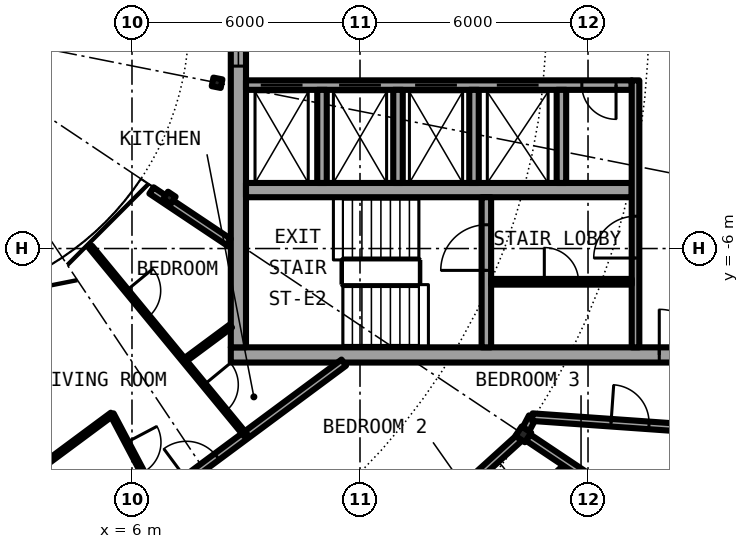
"""IFC4 building model, lengths in metres.
Left out: names, types, materials, properties, quantities, classifications, styles, units other than length and angle.
Written with IfcOpenShell. Run it as: python <this file> out.ifc"""

import sys

from ifc_helpers import new_model, si_unit, direction, frame, frame_2d, origin, origin_2d, place, context, subcontext, project, spatial, rectangle, i_section, extrude, element, fill, save


model = new_model("IFC4")
c1 = context("Model", 3, precision=1e-05, world=origin(), true_north=direction((0.0, 1.0)))
c2 = subcontext(c1, "Body", "Model", "MODEL_VIEW")
j1 = project(units=[si_unit("LENGTHUNIT", "METRE"), si_unit("PLANEANGLEUNIT", "RADIAN")], contexts=[c1])
p1 = place(None, origin())
s1 = spatial("IfcSite", under=j1, at=p1, CompositionType="ELEMENT")
p2 = place(p1, origin())
s2 = spatial("IfcBuilding", under=s1, at=p2, CompositionType="ELEMENT")
p3 = place(p2, frame((0.0, 0.0, 246.25)))
s3 = spatial("IfcBuildingStorey", under=s2, at=p3, CompositionType="ELEMENT", Elevation=246.25)
p4 = place(p3, frame((16.297, -10.889, 0.0), z_axis=(0.0, 0.0, 1.0), x_axis=(0.831469612303, -0.55557023302, 0.0)))
e1 = element("IfcColumn", 1, at=p4, inside=s3, PredefinedType="COLUMN", context=c2, shape_type="SweptSolid", body=[
    extrude(i_section(OverallWidth=0.3, OverallDepth=0.3, WebThickness=0.011, FlangeThickness=0.019, FilletRadius=0.027, at=origin_2d()), origin(), (0.0, 0.0, 1.0), 3.05),
])
for number, where, z_axis, x_axis in (
    (2, (6.984, -4.667, 0.0), (0.0, 0.0, 1.0), (0.831, -0.556, 0.0)),
    (3, (8.239, -1.639, 0.0), (0.0, 0.0, 1.0), (0.981, -0.195, 0.0)),
):
    element("IfcColumn", number, at=place(p3, frame(where, z_axis=z_axis, x_axis=x_axis)), inside=s3, PredefinedType="COLUMN", context=c2, shape_type="SweptSolid", body=[
        extrude(i_section(OverallWidth=0.24, OverallDepth=0.23, WebThickness=0.008, FlangeThickness=0.012, FilletRadius=0.021, at=origin_2d()), origin(), (0.0, 0.0, 1.0), 3.05),
    ])
p5 = place(p3, frame((8.6, -8.8, 0.0), z_axis=(0.0, 0.0, 1.0), x_axis=(1.0, 0.0, 0.0)))
e4 = element("IfcWall", 4, at=p5, inside=s3, PredefinedType="SHEAR", context=c2, shape_type="SweptSolid", body=[
    extrude(rectangle(XDim=13.4, YDim=0.4, at=frame_2d((6.7, 0.0))), origin(), (0.0, 0.0, 1.0), 3.05),
])
p6 = place(p5, frame((11.275, 0.0, 0.0)))
e5 = element("IfcOpeningElement", 5, at=p6, cuts=e4, PredefinedType="OPENING", context=c2, shape_type="SweptSolid", body=[
    extrude(rectangle(XDim=1.2, YDim=2.3, at=frame_2d((0.6, 1.15))), frame((0.0, 0.21, 0.0), z_axis=(0.0, -1.0, 0.0), x_axis=(1.0, 0.0, 0.0)), (0.0, 0.0, 1.0), 0.42),
])
p7 = place(p3, frame((8.8, -8.6, 0.0), z_axis=(0.0, 0.0, 1.0), x_axis=(0.0, 1.0, 0.0)))
e6 = element("IfcWall", 6, at=p7, inside=s3, PredefinedType="SHEAR", context=c2, shape_type="SweptSolid", body=[
    extrude(rectangle(XDim=17.2, YDim=0.4, at=frame_2d((8.6, 0.0))), origin(), (0.0, 0.0, 1.0), 3.05),
])
p8 = place(p7, frame((7.4, 0.0, 0.1)))
e7 = element("IfcOpeningElement", 7, at=p8, cuts=e6, PredefinedType="OPENING", context=c2, shape_type="SweptSolid", body=[
    extrude(rectangle(XDim=2.4, YDim=2.2, at=frame_2d((1.2, 1.1))), frame((0.0, 0.21, 0.0), z_axis=(0.0, -1.0, 0.0), x_axis=(1.0, 0.0, 0.0)), (0.0, 0.0, 1.0), 0.42),
])
p9 = place(p3, frame((19.15, -1.7, 0.0), z_axis=(0.0, 0.0, 1.0), x_axis=(-1.0, 0.0, 0.0)))
e8 = element("IfcWall", 8, at=p9, inside=s3, PredefinedType="SHEAR", context=c2, shape_type="SweptSolid", body=[
    extrude(rectangle(XDim=10.15, YDim=0.25, at=frame_2d((5.075, 0.0))), origin(), (0.0, 0.0, 1.0), 3.05),
])
p10 = place(p9, frame((8.663, 0.0, 0.0)))
e9 = element("IfcOpeningElement", 9, at=p10, cuts=e8, PredefinedType="OPENING", context=c2, shape_type="SweptSolid", body=[
    extrude(rectangle(XDim=1.1, YDim=2.3, at=frame_2d((0.55, 1.15))), frame((0.0, 0.135, 0.0), z_axis=(0.0, -1.0, 0.0), x_axis=(1.0, 0.0, 0.0)), (0.0, 0.0, 1.0), 0.27),
])
p11 = place(p9, frame((6.6, 0.0, 0.0)))
e10 = element("IfcOpeningElement", 10, at=p11, cuts=e8, PredefinedType="OPENING", context=c2, shape_type="SweptSolid", body=[
    extrude(rectangle(XDim=1.1, YDim=2.3, at=frame_2d((0.55, 1.15))), frame((0.0, 0.135, 0.0), z_axis=(0.0, -1.0, 0.0), x_axis=(1.0, 0.0, 0.0)), (0.0, 0.0, 1.0), 0.27),
])
p12 = place(p9, frame((4.6, 0.0, 0.0)))
e11 = element("IfcOpeningElement", 11, at=p12, cuts=e8, PredefinedType="OPENING", context=c2, shape_type="SweptSolid", body=[
    extrude(rectangle(XDim=1.1, YDim=2.3, at=frame_2d((0.55, 1.15))), frame((0.0, 0.135, 0.0), z_axis=(0.0, -1.0, 0.0), x_axis=(1.0, 0.0, 0.0)), (0.0, 0.0, 1.0), 0.27),
])
p13 = place(p9, frame((2.45, 0.0, 0.0)))
e12 = element("IfcOpeningElement", 12, at=p13, cuts=e8, PredefinedType="OPENING", context=c2, shape_type="SweptSolid", body=[
    extrude(rectangle(XDim=1.1, YDim=2.3, at=frame_2d((0.55, 1.15))), frame((0.0, 0.135, 0.0), z_axis=(0.0, -1.0, 0.0), x_axis=(1.0, 0.0, 0.0)), (0.0, 0.0, 1.0), 0.27),
])
p14 = place(p9, frame((0.413, 0.0, 0.0)))
e13 = element("IfcOpeningElement", 13, at=p14, cuts=e8, PredefinedType="OPENING", context=c2, shape_type="SweptSolid", body=[
    extrude(rectangle(XDim=0.9, YDim=2.3, at=frame_2d((0.45, 1.15))), frame((0.0, 0.135, 0.0), z_axis=(0.0, -1.0, 0.0), x_axis=(1.0, 0.0, 0.0)), (0.0, 0.0, 1.0), 0.27),
])
p15 = place(p3, frame((9.0, -4.462, 0.0), z_axis=(0.0, 0.0, 1.0), x_axis=(1.0, 0.0, 0.0)))
e14 = element("IfcWall", 14, at=p15, inside=s3, PredefinedType="SHEAR", context=c2, shape_type="SweptSolid", body=[
    extrude(rectangle(XDim=10.15, YDim=0.375, at=frame_2d((5.075, 0.0))), origin(), (0.0, 0.0, 1.0), 3.05),
])
p16 = place(p3, frame((15.325, -8.6, 0.0), z_axis=(0.0, 0.0, 1.0), x_axis=(0.0, 1.0, 0.0)))
e15 = element("IfcWall", 15, at=p16, inside=s3, PredefinedType="SHEAR", context=c2, shape_type="SweptSolid", body=[
    extrude(rectangle(XDim=3.95, YDim=0.25, at=frame_2d((1.975, 0.0))), origin(), (0.0, 0.0, 1.0), 3.05),
])
p17 = place(p16, frame((2.025, 0.0, 0.0)))
e16 = element("IfcOpeningElement", 16, at=p17, cuts=e15, PredefinedType="OPENING", context=c2, shape_type="SweptSolid", body=[
    extrude(rectangle(XDim=1.2, YDim=2.3, at=frame_2d((0.6, 1.15))), frame((0.0, 0.135, 0.0), z_axis=(0.0, -1.0, 0.0), x_axis=(1.0, 0.0, 0.0)), (0.0, 0.0, 1.0), 0.27),
])
for number, where, z_axis, x_axis in (
    (17, (15.0, -1.825, 0.0), (0.0, 0.0, 1.0), (0.0, -1.0, 0.0)),
    (18, (17.3, -1.825, 0.0), (0.0, 0.0, 1.0), (0.0, -1.0, 0.0)),
):
    element("IfcWall", number, at=place(p3, frame(where, z_axis=z_axis, x_axis=x_axis)), inside=s3, PredefinedType="SOLIDWALL", context=c2, shape_type="SweptSolid", body=[
        extrude(rectangle(XDim=2.45, YDim=0.25, at=frame_2d((1.225, 0.0))), origin(), (0.0, 0.0, 1.0), 2.7),
    ])
p18 = place(p3, frame((19.25, -8.6, 0.0), z_axis=(0.0, 0.0, 1.0), x_axis=(0.0, 1.0, 0.0)))
e19 = element("IfcWall", 19, at=p18, inside=s3, PredefinedType="SOLIDWALL", context=c2, shape_type="SweptSolid", body=[
    extrude(rectangle(XDim=7.025, YDim=0.2, at=frame_2d((3.513, 0.0))), origin(), (0.0, 0.0, 1.0), 2.7),
])
p19 = place(p18, frame((2.35, 0.0, 0.0)))
e20 = element("IfcOpeningElement", 20, at=p19, cuts=e19, PredefinedType="OPENING", context=c2, shape_type="SweptSolid", body=[
    extrude(rectangle(XDim=1.1, YDim=2.3, at=frame_2d((0.55, 1.15))), frame((0.0, 0.11, 0.0), z_axis=(0.0, -1.0, 0.0), x_axis=(1.0, 0.0, 0.0)), (0.0, 0.0, 1.0), 0.22),
])
for number, where, z_axis, x_axis in (
    (21, (11.0, -1.825, 0.0), (0.0, 0.0, 1.0), (0.0, -1.0, 0.0)),
    (22, (13.0, -1.825, 0.0), (0.0, 0.0, 1.0), (0.0, -1.0, 0.0)),
):
    element("IfcWall", number, at=place(p3, frame(where, z_axis=z_axis, x_axis=x_axis)), inside=s3, PredefinedType="SOLIDWALL", context=c2, shape_type="SweptSolid", body=[
        extrude(rectangle(XDim=2.45, YDim=0.25, at=frame_2d((1.225, 0.0))), origin(), (0.0, 0.0, 1.0), 2.7),
    ])
p20 = place(p3, frame((15.45, -6.875, 0.0), z_axis=(0.0, 0.0, 1.0), x_axis=(1.0, 0.0, 0.0)))
e23 = element("IfcWall", 23, at=p20, inside=s3, PredefinedType="PARTITIONING", context=c2, shape_type="SweptSolid", body=[
    extrude(rectangle(XDim=3.7, YDim=0.15, at=frame_2d((1.85, 0.0))), origin(), (0.0, 0.0, 1.0), 2.7),
])
p21 = place(p20, frame((1.4, 0.0, 0.0)))
e24 = element("IfcOpeningElement", 24, at=p21, cuts=e23, PredefinedType="OPENING", context=c2, shape_type="SweptSolid", body=[
    extrude(rectangle(XDim=0.9, YDim=2.3, at=frame_2d((0.45, 1.15))), frame((0.0, 0.085, 0.0), z_axis=(0.0, -1.0, 0.0), x_axis=(1.0, 0.0, 0.0)), (0.0, 0.0, 1.0), 0.17),
])
p22 = place(p3, frame((12.92, -15.785, 0.0), z_axis=(0.0, 0.0, 1.0), x_axis=(0.74123210671, 0.671248809297, 0.0)))
e25 = element("IfcWall", 25, at=p22, inside=s3, PredefinedType="PARTITIONING", context=c2, shape_type="SweptSolid", body=[
    extrude(rectangle(XDim=6.115, YDim=0.1, at=frame_2d((3.058, 0.0))), origin(), (0.0, 0.0, 1.0), 2.7),
])
p23 = place(p22, frame((2.622, 0.0, 0.0)))
e26 = element("IfcOpeningElement", 26, at=p23, cuts=e25, PredefinedType="OPENING", context=c2, shape_type="SweptSolid", body=[
    extrude(rectangle(XDim=0.9, YDim=2.3, at=frame_2d((0.45, 1.15))), frame((0.0, 0.06, 0.0), z_axis=(0.0, -1.0, 0.0), x_axis=(1.0, 0.0, 0.0)), (0.0, 0.0, 1.0), 0.12),
])
p24 = place(p3, frame((16.367, -10.756, 0.0), z_axis=(0.0, 0.0, 1.0), x_axis=(0.465802239822, 0.884888848035, 0.0)))
e27 = element("IfcWall", 27, at=p24, inside=s3, PredefinedType="PARTITIONING", context=c2, shape_type="SweptSolid", body=[
    extrude(rectangle(XDim=0.361, YDim=0.2, at=frame_2d((0.18, 0.0))), origin(), (0.0, 0.0, 1.0), 2.7),
])
p25 = place(p3, frame((9.239, -17.286, 0.0), z_axis=(0.0, 0.0, 1.0), x_axis=(0.740934281602, 0.671577538596, 0.0)))
e28 = element("IfcWall", 28, at=p25, inside=s3, PredefinedType="PARTITIONING", context=c2, shape_type="SweptSolid", body=[
    extrude(rectangle(XDim=9.37, YDim=0.2, at=frame_2d((4.685, 0.0))), origin(), (0.0, 0.0, 1.0), 2.45),
])
p26 = place(p25, frame((4.263, 0.0, 0.0)))
e29 = element("IfcOpeningElement", 29, at=p26, cuts=e28, PredefinedType="OPENING", context=c2, shape_type="SweptSolid", body=[
    extrude(rectangle(XDim=1.0, YDim=2.3, at=frame_2d((0.5, 1.15))), frame((0.0, 0.11, 0.0), z_axis=(0.0, -1.0, 0.0), x_axis=(1.0, 0.0, 0.0)), (0.0, 0.0, 1.0), 0.22),
])
p27 = place(p3, frame((4.354, -14.354, 0.0), z_axis=(0.0, 0.0, 1.0), x_axis=(0.80330975478, 0.595561447607, 0.0)))
e30 = element("IfcWall", 30, at=p27, inside=s3, PredefinedType="PARTITIONING", context=c2, shape_type="SweptSolid", body=[
    extrude(rectangle(XDim=8.987, YDim=0.2, at=frame_2d((4.493, 0.0))), origin(), (0.0, 0.0, 1.0), 2.7),
])
p28 = place(p27, frame((3.832, 0.0, 0.0)))
e31 = element("IfcOpeningElement", 31, at=p28, cuts=e30, PredefinedType="OPENING", context=c2, shape_type="SweptSolid", body=[
    extrude(rectangle(XDim=1.0, YDim=2.3, at=frame_2d((0.5, 1.15))), frame((0.0, 0.11, 0.0), z_axis=(0.0, -1.0, 0.0), x_axis=(1.0, 0.0, 0.0)), (0.0, 0.0, 1.0), 0.22),
])
p29 = place(p3, frame((3.571, -11.77, 0.0), z_axis=(0.0, 0.0, 1.0), x_axis=(0.803182415278, 0.59573316828, 0.0)))
e32 = element("IfcWall", 32, at=p29, inside=s3, PredefinedType="PARTITIONING", context=c2, shape_type="SweptSolid", body=[
    extrude(rectangle(XDim=2.367, YDim=0.1, at=frame_2d((1.183, 0.0))), origin(), (0.0, 0.0, 1.0), 2.7),
])
p30 = place(p3, frame((7.376, -8.948, 0.0), z_axis=(0.0, 0.0, 1.0), x_axis=(0.80332760487, 0.595537370157, 0.0)))
e33 = element("IfcWall", 33, at=p30, inside=s3, PredefinedType="PARTITIONING", context=c2, shape_type="SweptSolid", body=[
    extrude(rectangle(XDim=1.526, YDim=0.1, at=frame_2d((0.763, 0.0))), origin(), (0.0, 0.0, 1.0), 2.7),
])
p31 = place(p3, frame((16.535, -10.437, 0.0), z_axis=(0.0, 0.0, 1.0), x_axis=(0.997515141784, -0.070452408845, 0.0)))
e34 = element("IfcWall", 34, at=p31, inside=s3, PredefinedType="PARTITIONING", context=c2, shape_type="SweptSolid", body=[
    extrude(rectangle(XDim=5.153, YDim=0.2, at=frame_2d((2.576, 0.0))), origin(), (0.0, 0.0, 1.0), 2.7),
])
p32 = place(p31, frame((2.076, 0.0, 0.0)))
e35 = element("IfcOpeningElement", 35, at=p32, cuts=e34, PredefinedType="OPENING", context=c2, shape_type="SweptSolid", body=[
    extrude(rectangle(XDim=1.0, YDim=2.3, at=frame_2d((0.5, 1.15))), frame((0.0, 0.11, 0.0), z_axis=(0.0, -1.0, 0.0), x_axis=(1.0, 0.0, 0.0)), (0.0, 0.0, 1.0), 0.22),
])
p33 = place(p3, frame((6.513, -4.472, 0.0), z_axis=(0.0, 0.0, 1.0), x_axis=(0.831450132577, -0.555599385382, 0.0)))
e36 = element("IfcWall", 36, at=p33, inside=s3, PredefinedType="PARTITIONING", context=c2, shape_type="SweptSolid", body=[
    extrude(rectangle(XDim=2.443, YDim=0.2, at=frame_2d((1.221, 0.0))), origin(), (0.0, 0.0, 1.0), 2.7),
])
p34 = place(p3, frame((2.241, -7.388, 0.0), z_axis=(0.0, 0.0, 1.0), x_axis=(0.29039551313, -0.956906707027, 0.0)))
e37 = element("IfcWall", 37, at=p34, inside=s3, PredefinedType="PARTITIONING", context=c2, shape_type="SweptSolid", body=[
    extrude(rectangle(XDim=7.28, YDim=0.2, at=frame_2d((3.64, 0.0))), origin(), (0.0, 0.0, 1.0), 2.7),
])
p35 = place(p3, frame((4.909, -5.958, 0.0), z_axis=(0.0, 0.0, 1.0), x_axis=(0.635941750694, -0.771737059965, 0.0)))
e38 = element("IfcWall", 38, at=p35, inside=s3, PredefinedType="PARTITIONING", context=c2, shape_type="SweptSolid", body=[
    extrude(rectangle(XDim=6.422, YDim=0.1, at=frame_2d((3.211, 0.0))), origin(), (0.0, 0.0, 1.0), 2.7),
])
p36 = place(p35, frame((4.699, 0.0, 0.0)))
e39 = element("IfcOpeningElement", 39, at=p36, cuts=e38, PredefinedType="OPENING", context=c2, shape_type="SweptSolid", body=[
    extrude(rectangle(XDim=0.9, YDim=2.3, at=frame_2d((0.45, 1.15))), frame((0.0, 0.06, 0.0), z_axis=(0.0, -1.0, 0.0), x_axis=(1.0, 0.0, 0.0)), (0.0, 0.0, 1.0), 0.12),
])
p37 = place(p35, frame((1.488, 0.0, 0.0)))
e40 = element("IfcOpeningElement", 40, at=p37, cuts=e38, PredefinedType="OPENING", context=c2, shape_type="SweptSolid", body=[
    extrude(rectangle(XDim=0.9, YDim=2.3, at=frame_2d((0.45, 1.15))), frame((0.0, 0.06, 0.0), z_axis=(0.0, -1.0, 0.0), x_axis=(1.0, 0.0, 0.0)), (0.0, 0.0, 1.0), 0.12),
])
p38 = place(p3, frame((5.472, -10.36, 0.0), z_axis=(0.0, 0.0, 1.0), x_axis=(0.467373035141, -0.884060204976, 0.0)))
e41 = element("IfcWall", 41, at=p38, inside=s3, PredefinedType="PARTITIONING", context=c2, shape_type="SweptSolid", body=[
    extrude(rectangle(XDim=2.572, YDim=0.1, at=frame_2d((1.286, 0.0))), origin(), (0.0, 0.0, 1.0), 2.7),
])
p39 = place(p38, frame((0.836, 0.0, 0.0)))
e42 = element("IfcOpeningElement", 42, at=p39, cuts=e41, PredefinedType="OPENING", context=c2, shape_type="SweptSolid", body=[
    extrude(rectangle(XDim=0.9, YDim=2.3, at=frame_2d((0.45, 1.15))), frame((0.0, 0.06, 0.0), z_axis=(0.0, -1.0, 0.0), x_axis=(1.0, 0.0, 0.0)), (0.0, 0.0, 1.0), 0.12),
])
p40 = place(p3, frame((16.422, -10.972, 0.0), z_axis=(0.0, 0.0, 1.0), x_axis=(0.83131782921, -0.555797325324, 0.0)))
e43 = element("IfcWall", 43, at=p40, inside=s3, PredefinedType="PARTITIONING", context=c2, shape_type="SweptSolid", body=[
    extrude(rectangle(XDim=2.823, YDim=0.2, at=frame_2d((1.412, 0.0))), origin(), (0.0, 0.0, 1.0), 2.7),
])
p41 = place(p10, origin())
e44 = element("IfcDoor", 44, at=p41, inside=s3, OperationType="DOUBLE_DOOR_SLIDING", PredefinedType="DOOR", context=c2, shape_type="SweptSolid", body=[
    extrude(rectangle(XDim=1.1, YDim=2.3, at=frame_2d((0.55, 1.15))), frame((0.0, 0.025, 0.0), z_axis=(0.0, -1.0, 0.0), x_axis=(1.0, 0.0, 0.0)), (0.0, 0.0, 1.0), 0.05),
])
fill(e9, e44)
p42 = place(p11, origin())
e45 = element("IfcDoor", 45, at=p42, inside=s3, OperationType="DOUBLE_DOOR_SLIDING", PredefinedType="DOOR", context=c2, shape_type="SweptSolid", body=[
    extrude(rectangle(XDim=1.1, YDim=2.3, at=frame_2d((0.55, 1.15))), frame((0.0, 0.025, 0.0), z_axis=(0.0, -1.0, 0.0), x_axis=(1.0, 0.0, 0.0)), (0.0, 0.0, 1.0), 0.05),
])
fill(e10, e45)
p43 = place(p12, origin())
e46 = element("IfcDoor", 46, at=p43, inside=s3, OperationType="DOUBLE_DOOR_SLIDING", PredefinedType="DOOR", context=c2, shape_type="SweptSolid", body=[
    extrude(rectangle(XDim=1.1, YDim=2.3, at=frame_2d((0.55, 1.15))), frame((0.0, 0.025, 0.0), z_axis=(0.0, -1.0, 0.0), x_axis=(1.0, 0.0, 0.0)), (0.0, 0.0, 1.0), 0.05),
])
fill(e11, e46)
p44 = place(p13, origin())
e47 = element("IfcDoor", 47, at=p44, inside=s3, OperationType="DOUBLE_DOOR_SLIDING", PredefinedType="DOOR", context=c2, shape_type="SweptSolid", body=[
    extrude(rectangle(XDim=1.1, YDim=2.3, at=frame_2d((0.55, 1.15))), frame((0.0, 0.025, 0.0), z_axis=(0.0, -1.0, 0.0), x_axis=(1.0, 0.0, 0.0)), (0.0, 0.0, 1.0), 0.05),
])
fill(e12, e47)
p45 = place(p14, origin())
e48 = element("IfcDoor", 48, at=p45, inside=s3, OperationType="SINGLE_SWING_RIGHT", PredefinedType="DOOR", context=c2, shape_type="SweptSolid", body=[
    extrude(rectangle(XDim=0.9, YDim=2.3, at=frame_2d((0.45, 1.15))), frame((0.0, 0.025, 0.0), z_axis=(0.0, -1.0, 0.0), x_axis=(1.0, 0.0, 0.0)), (0.0, 0.0, 1.0), 0.05),
])
fill(e13, e48)
p46 = place(p21, origin())
e49 = element("IfcDoor", 49, at=p46, inside=s3, OperationType="SINGLE_SWING_LEFT", PredefinedType="DOOR", context=c2, shape_type="SweptSolid", body=[
    extrude(rectangle(XDim=0.9, YDim=2.3, at=frame_2d((0.45, 1.15))), frame((0.0, 0.025, 0.0), z_axis=(0.0, -1.0, 0.0), x_axis=(1.0, 0.0, 0.0)), (0.0, 0.0, 1.0), 0.05),
])
fill(e24, e49)
p47 = place(p17, origin())
e50 = element("IfcDoor", 50, at=p47, inside=s3, OperationType="SINGLE_SWING_LEFT", PredefinedType="DOOR", context=c2, shape_type="SweptSolid", body=[
    extrude(rectangle(XDim=1.2, YDim=2.3, at=frame_2d((0.6, 1.15))), frame((0.0, 0.025, 0.0), z_axis=(0.0, -1.0, 0.0), x_axis=(1.0, 0.0, 0.0)), (0.0, 0.0, 1.0), 0.05),
])
fill(e16, e50)
p48 = place(p19, origin())
e51 = element("IfcDoor", 51, at=p48, inside=s3, OperationType="SINGLE_SWING_RIGHT", PredefinedType="DOOR", context=c2, shape_type="SweptSolid", body=[
    extrude(rectangle(XDim=1.1, YDim=2.3, at=frame_2d((0.55, 1.15))), frame((0.0, 0.025, 0.0), z_axis=(0.0, -1.0, 0.0), x_axis=(1.0, 0.0, 0.0)), (0.0, 0.0, 1.0), 0.05),
])
fill(e20, e51)
p49 = place(p6, origin())
e52 = element("IfcDoor", 52, at=p49, inside=s3, OperationType="SINGLE_SWING_LEFT", PredefinedType="DOOR", context=c2, shape_type="SweptSolid", body=[
    extrude(rectangle(XDim=1.2, YDim=2.3, at=frame_2d((0.6, 1.15))), frame((0.0, 0.025, 0.0), z_axis=(0.0, -1.0, 0.0), x_axis=(1.0, 0.0, 0.0)), (0.0, 0.0, 1.0), 0.05),
])
fill(e5, e52)
p50 = place(p8, origin())
e53 = element("IfcWindow", 53, at=p50, inside=s3, PartitioningType="SINGLE_PANEL", PredefinedType="WINDOW", context=c2, shape_type="SweptSolid", body=[
    extrude(rectangle(XDim=2.4, YDim=2.2, at=frame_2d((1.2, 1.1))), frame((0.0, 0.03, 0.0), z_axis=(0.0, -1.0, 0.0), x_axis=(1.0, 0.0, 0.0)), (0.0, 0.0, 1.0), 0.06),
])
fill(e7, e53)
p51 = place(p28, origin())
e54 = element("IfcDoor", 54, at=p51, inside=s3, OperationType="SINGLE_SWING_LEFT", PredefinedType="DOOR", context=c2, shape_type="SweptSolid", body=[
    extrude(rectangle(XDim=1.0, YDim=2.3, at=frame_2d((0.5, 1.15))), frame((0.0, 0.025, 0.0), z_axis=(0.0, -1.0, 0.0), x_axis=(1.0, 0.0, 0.0)), (0.0, 0.0, 1.0), 0.05),
])
fill(e31, e54)
p52 = place(p39, origin())
e55 = element("IfcDoor", 55, at=p52, inside=s3, OperationType="SINGLE_SWING_LEFT", PredefinedType="DOOR", context=c2, shape_type="SweptSolid", body=[
    extrude(rectangle(XDim=0.9, YDim=2.3, at=frame_2d((0.45, 1.15))), frame((0.0, 0.025, 0.0), z_axis=(0.0, -1.0, 0.0), x_axis=(1.0, 0.0, 0.0)), (0.0, 0.0, 1.0), 0.05),
])
fill(e42, e55)
p53 = place(p36, origin())
e56 = element("IfcDoor", 56, at=p53, inside=s3, OperationType="SINGLE_SWING_RIGHT", PredefinedType="DOOR", context=c2, shape_type="SweptSolid", body=[
    extrude(rectangle(XDim=0.9, YDim=2.3, at=frame_2d((0.45, 1.15))), frame((0.0, 0.025, 0.0), z_axis=(0.0, -1.0, 0.0), x_axis=(1.0, 0.0, 0.0)), (0.0, 0.0, 1.0), 0.05),
])
fill(e39, e56)
p54 = place(p37, origin())
e57 = element("IfcDoor", 57, at=p54, inside=s3, OperationType="SINGLE_SWING_LEFT", PredefinedType="DOOR", context=c2, shape_type="SweptSolid", body=[
    extrude(rectangle(XDim=0.9, YDim=2.3, at=frame_2d((0.45, 1.15))), frame((0.0, 0.025, 0.0), z_axis=(0.0, -1.0, 0.0), x_axis=(1.0, 0.0, 0.0)), (0.0, 0.0, 1.0), 0.05),
])
fill(e40, e57)
p55 = place(p32, origin())
e58 = element("IfcDoor", 58, at=p55, inside=s3, OperationType="SINGLE_SWING_LEFT", PredefinedType="DOOR", context=c2, shape_type="SweptSolid", body=[
    extrude(rectangle(XDim=1.0, YDim=2.3, at=frame_2d((0.5, 1.15))), frame((0.0, 0.025, 0.0), z_axis=(0.0, -1.0, 0.0), x_axis=(1.0, 0.0, 0.0)), (0.0, 0.0, 1.0), 0.05),
])
fill(e35, e58)
save(model, sys.argv[1])
